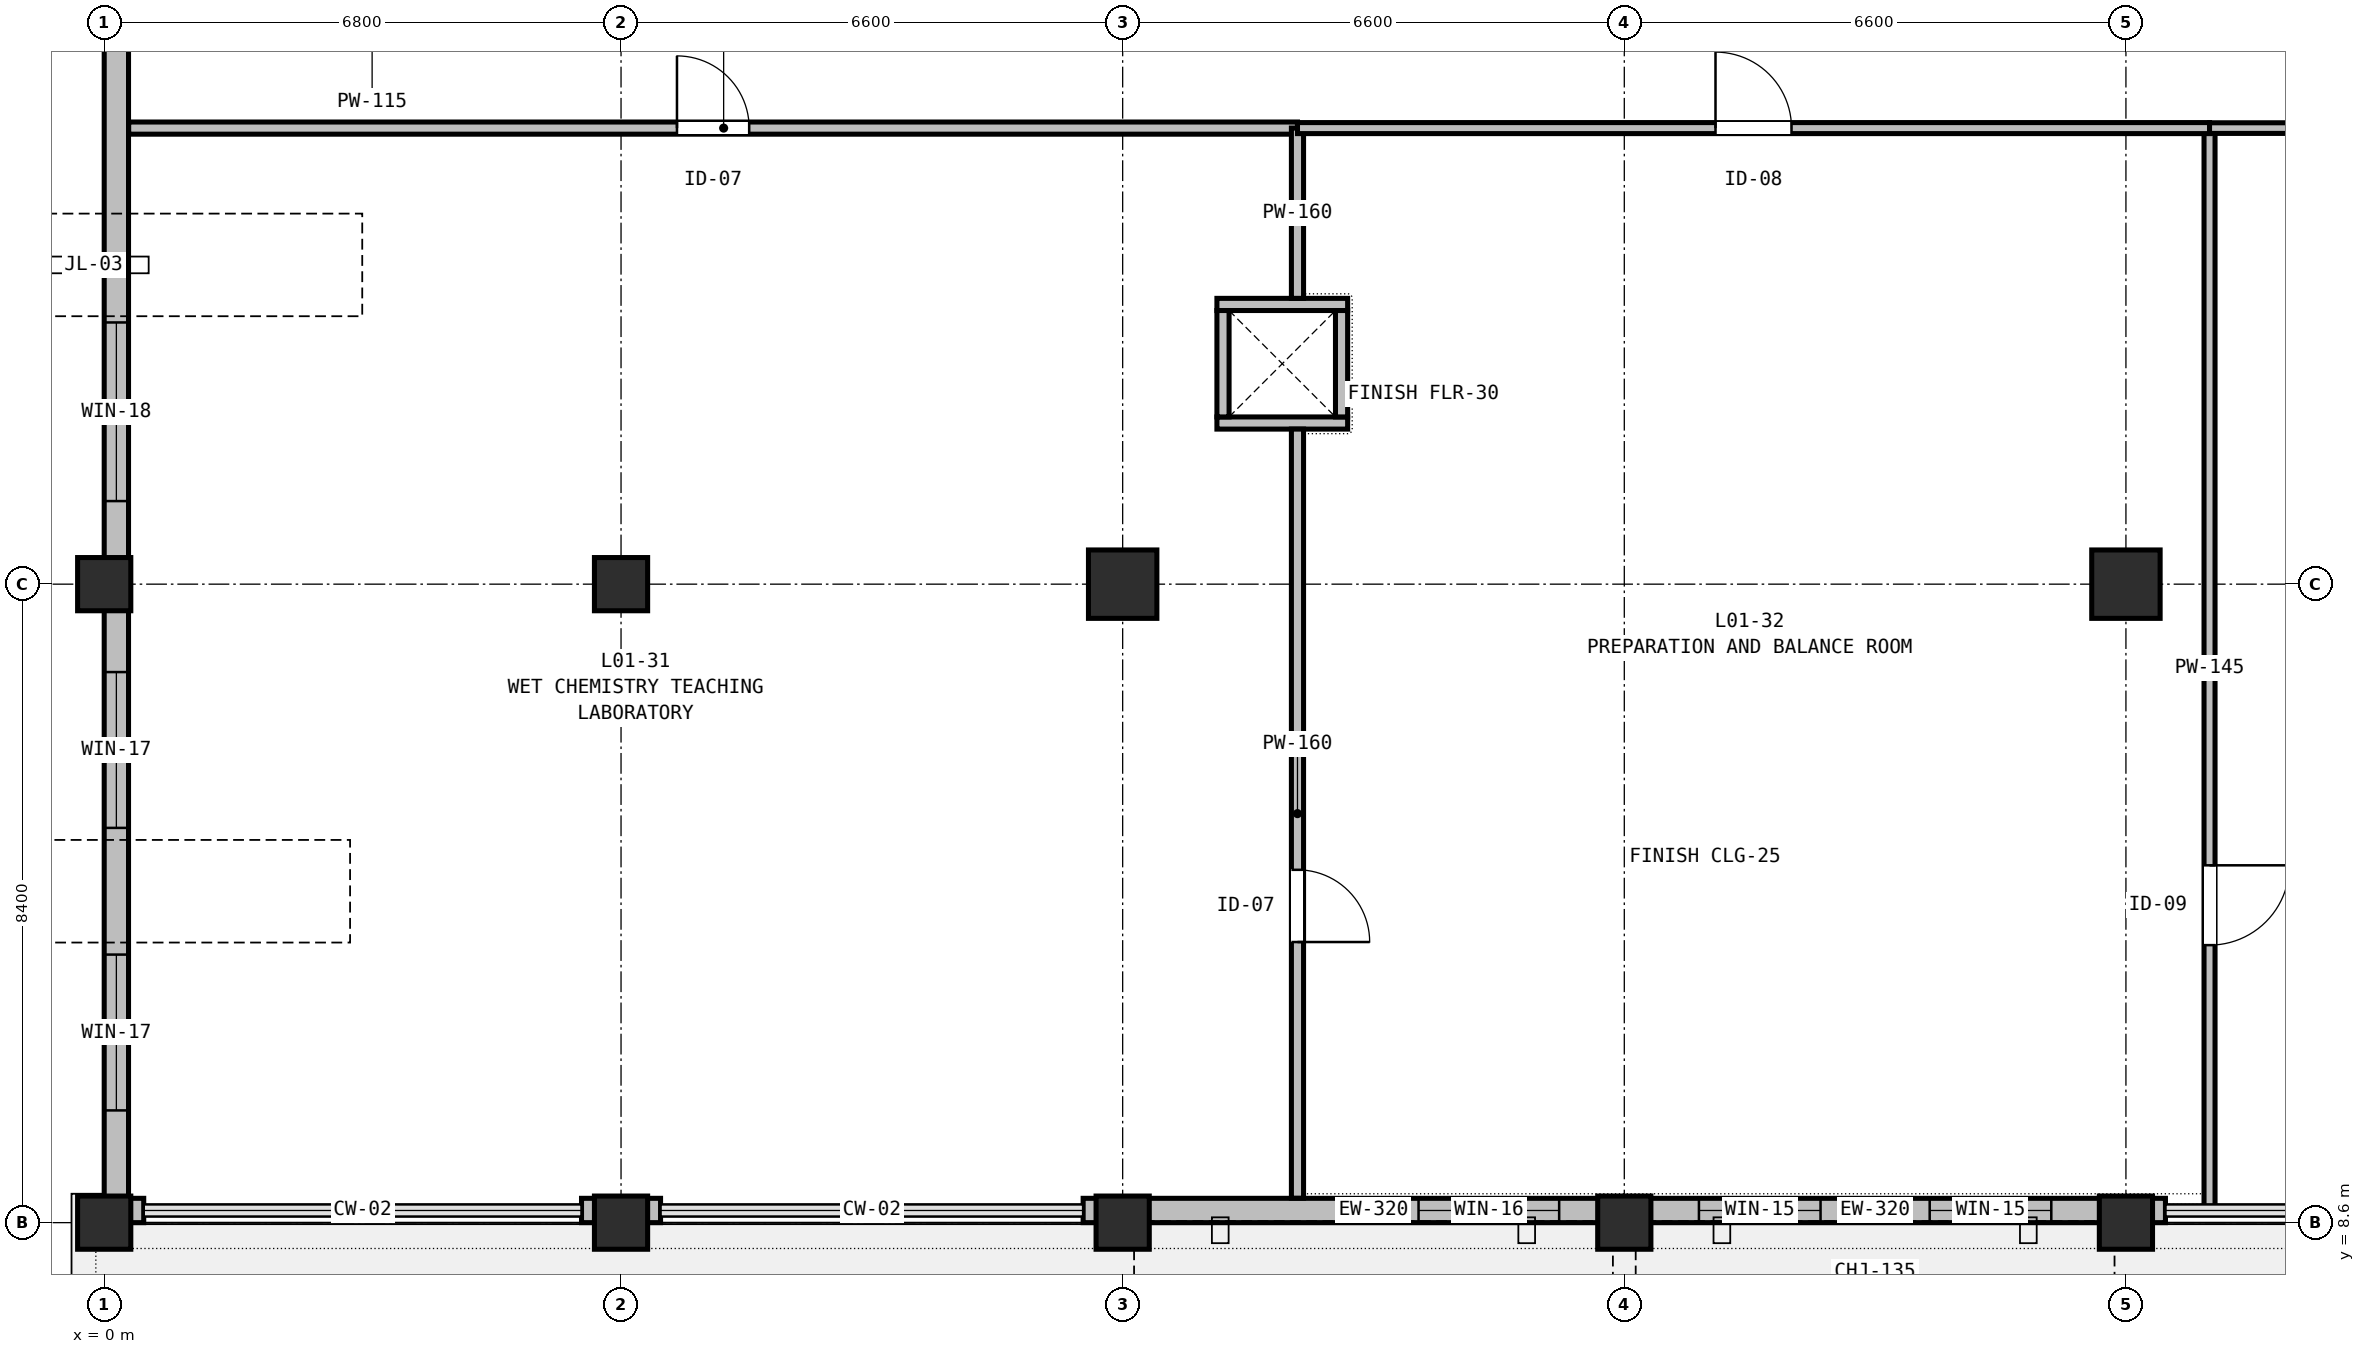
"""IFC4 building model, lengths in metres.
Left out: names, types, materials, properties, quantities, classifications, styles, units other than length and angle.
Written with IfcOpenShell. Run it as: python <this file> out.ifc"""

import sys

from ifc_helpers import new_model, si_unit, direction, frame, frame_2d, origin, origin_2d, place, context, subcontext, project, spatial, rectangle, extrude, element, fill, save


model = new_model("IFC4")
c1 = context("Model", 3, precision=1e-05, world=origin(), true_north=direction((0.0, 1.0)))
c2 = subcontext(c1, "Body", "Model", "MODEL_VIEW")
j1 = project(units=[si_unit("LENGTHUNIT", "METRE"), si_unit("PLANEANGLEUNIT", "RADIAN")], contexts=[c1])
p1 = place(None, origin())
s1 = spatial("IfcSite", under=j1, at=p1, CompositionType="ELEMENT")
p2 = place(p1, origin())
s2 = spatial("IfcBuilding", under=s1, at=p2, CompositionType="ELEMENT")
p3 = place(p2, frame((0.0, 0.0, 5.4)))
s3 = spatial("IfcBuildingStorey", under=s2, at=p3, CompositionType="ELEMENT", Elevation=5.4)
for number, where, z_axis, x_axis in (
    (1, (0.0, 8.6, 0.0), (0.0, 0.0, 1.0), (1.0, 0.0, 0.0)),
    (2, (0.0, 17.0, 0.0), (0.0, 0.0, 1.0), (1.0, 0.0, 0.0)),
):
    element("IfcColumn", number, at=place(p3, frame(where, z_axis=z_axis, x_axis=x_axis)), inside=s3, PredefinedType="COLUMN", context=c2, shape_type="SweptSolid", body=[
        extrude(rectangle(XDim=0.7, YDim=0.7, at=origin_2d()), origin(), (0.0, 0.0, 1.0), 4.74),
    ])
for number, where, z_axis, x_axis in (
    (3, (6.8, 8.6, 0.0), (0.0, 0.0, 1.0), (1.0, 0.0, 0.0)),
    (4, (6.8, 17.0, 0.0), (0.0, 0.0, 1.0), (1.0, 0.0, 0.0)),
    (5, (13.4, 8.6, 0.0), (0.0, 0.0, 1.0), (1.0, 0.0, 0.0)),
):
    element("IfcColumn", number, at=place(p3, frame(where, z_axis=z_axis, x_axis=x_axis)), inside=s3, PredefinedType="COLUMN", context=c2, shape_type="SweptSolid", body=[
        extrude(rectangle(XDim=0.7, YDim=0.7, at=origin_2d()), origin(), (0.0, 0.0, 1.0), 4.8),
    ])
p4 = place(p3, frame((13.4, 17.0, 0.0), z_axis=(0.0, 0.0, 1.0), x_axis=(1.0, 0.0, 0.0)))
e6 = element("IfcColumn", 6, at=p4, inside=s3, PredefinedType="COLUMN", context=c2, shape_type="SweptSolid", body=[
    extrude(rectangle(XDim=0.9, YDim=0.9, at=origin_2d()), origin(), (0.0, 0.0, 1.0), 4.8),
])
for number, where, z_axis, x_axis in (
    (7, (20.0, 8.6, 0.0), (0.0, 0.0, 1.0), (1.0, 0.0, 0.0)),
    (8, (26.6, 8.6, 0.0), (0.0, 0.0, 1.0), (1.0, 0.0, 0.0)),
):
    element("IfcColumn", number, at=place(p3, frame(where, z_axis=z_axis, x_axis=x_axis)), inside=s3, PredefinedType="COLUMN", context=c2, shape_type="SweptSolid", body=[
        extrude(rectangle(XDim=0.7, YDim=0.7, at=origin_2d()), origin(), (0.0, 0.0, 1.0), 4.8),
    ])
p5 = place(p3, frame((26.6, 17.0, 0.0), z_axis=(0.0, 0.0, 1.0), x_axis=(1.0, 0.0, 0.0)))
e9 = element("IfcColumn", 9, at=p5, inside=s3, PredefinedType="COLUMN", context=c2, shape_type="SweptSolid", body=[
    extrude(rectangle(XDim=0.9, YDim=0.9, at=origin_2d()), origin(), (0.0, 0.0, 1.0), 4.8),
])
p6 = place(p3, frame((27.12, 8.76, 0.0), z_axis=(0.0, 0.0, 1.0), x_axis=(-1.0, 0.0, 0.0)))
e10 = element("IfcWall", 10, at=p6, inside=s3, PredefinedType="STANDARD", context=c2, shape_type="SweptSolid", body=[
    extrude(rectangle(XDim=0.52, YDim=0.32, at=frame_2d((0.26, 0.0))), origin(), (0.0, 0.0, 1.0), 3.935),
])
p7 = place(p3, frame((26.6, 8.76, 0.0), z_axis=(0.0, 0.0, 1.0), x_axis=(-1.0, 0.0, 0.0)))
e11 = element("IfcWall", 11, at=p7, inside=s3, PredefinedType="STANDARD", context=c2, shape_type="SweptSolid", body=[
    extrude(rectangle(XDim=6.6, YDim=0.32, at=frame_2d((3.3, 0.0))), origin(), (0.0, 0.0, 1.0), 3.935),
])
p8 = place(p7, frame((0.982, 0.0, 0.9)))
e12 = element("IfcOpeningElement", 12, at=p8, cuts=e11, PredefinedType="OPENING", context=c2, shape_type="SweptSolid", body=[
    extrude(rectangle(XDim=1.6, YDim=1.6, at=frame_2d((0.8, 0.8))), frame((0.0, 0.17, 0.0), z_axis=(0.0, -1.0, 0.0), x_axis=(1.0, 0.0, 0.0)), (0.0, 0.0, 1.0), 0.34),
])
p9 = place(p7, frame((4.018, 0.0, 0.9)))
e13 = element("IfcOpeningElement", 13, at=p9, cuts=e11, PredefinedType="OPENING", context=c2, shape_type="SweptSolid", body=[
    extrude(rectangle(XDim=1.6, YDim=1.6, at=frame_2d((0.8, 0.8))), frame((0.0, 0.17, 0.0), z_axis=(0.0, -1.0, 0.0), x_axis=(1.0, 0.0, 0.0)), (0.0, 0.0, 1.0), 0.34),
])
p10 = place(p3, frame((20.0, 8.76, 0.0), z_axis=(0.0, 0.0, 1.0), x_axis=(-1.0, 0.0, 0.0)))
e14 = element("IfcWall", 14, at=p10, inside=s3, PredefinedType="STANDARD", context=c2, shape_type="SweptSolid", body=[
    extrude(rectangle(XDim=6.6, YDim=0.32, at=frame_2d((3.3, 0.0))), origin(), (0.0, 0.0, 1.0), 3.935),
])
p11 = place(p10, frame((0.857, 0.0, 0.9)))
e15 = element("IfcOpeningElement", 15, at=p11, cuts=e14, PredefinedType="OPENING", context=c2, shape_type="SweptSolid", body=[
    extrude(rectangle(XDim=1.85, YDim=1.6, at=frame_2d((0.925, 0.8))), frame((0.0, 0.17, 0.0), z_axis=(0.0, -1.0, 0.0), x_axis=(1.0, 0.0, 0.0)), (0.0, 0.0, 1.0), 0.34),
])
for number, where, z_axis, x_axis in (
    (16, (13.4, 8.76, 0.0), (0.0, 0.0, 1.0), (-1.0, 0.0, 0.0)),
    (17, (7.32, 8.76, 0.0), (0.0, 0.0, 1.0), (-1.0, 0.0, 0.0)),
    (18, (6.8, 8.76, 0.0), (0.0, 0.0, 1.0), (-1.0, 0.0, 0.0)),
    (19, (0.52, 8.76, 0.0), (0.0, 0.0, 1.0), (-1.0, 0.0, 0.0)),
):
    element("IfcWall", number, at=place(p3, frame(where, z_axis=z_axis, x_axis=x_axis)), inside=s3, PredefinedType="STANDARD", context=c2, shape_type="SweptSolid", body=[
        extrude(rectangle(XDim=0.52, YDim=0.32, at=frame_2d((0.26, 0.0))), origin(), (0.0, 0.0, 1.0), 3.935),
    ])
p12 = place(p3, frame((0.16, 8.92, 0.0), z_axis=(0.0, 0.0, 1.0), x_axis=(0.0, 1.0, 0.0)))
e20 = element("IfcWall", 20, at=p12, inside=s3, PredefinedType="STANDARD", context=c2, shape_type="SweptSolid", body=[
    extrude(rectangle(XDim=8.08, YDim=0.32, at=frame_2d((4.04, 0.0))), origin(), (0.0, 0.0, 1.0), 4.085),
])
p13 = place(p12, frame((1.156, 0.0, 0.9)))
e21 = element("IfcOpeningElement", 21, at=p13, cuts=e20, PredefinedType="OPENING", context=c2, shape_type="SweptSolid", body=[
    extrude(rectangle(XDim=2.05, YDim=1.65, at=frame_2d((1.025, 0.825))), frame((0.0, 0.17, 0.0), z_axis=(0.0, -1.0, 0.0), x_axis=(1.0, 0.0, 0.0)), (0.0, 0.0, 1.0), 0.34),
])
p14 = place(p12, frame((4.873, 0.0, 0.9)))
e22 = element("IfcOpeningElement", 22, at=p14, cuts=e20, PredefinedType="OPENING", context=c2, shape_type="SweptSolid", body=[
    extrude(rectangle(XDim=2.05, YDim=1.65, at=frame_2d((1.025, 0.825))), frame((0.0, 0.17, 0.0), z_axis=(0.0, -1.0, 0.0), x_axis=(1.0, 0.0, 0.0)), (0.0, 0.0, 1.0), 0.34),
])
p15 = place(p3, frame((0.16, 17.0, 0.0), z_axis=(0.0, 0.0, 1.0), x_axis=(0.0, 1.0, 0.0)))
e23 = element("IfcWall", 23, at=p15, inside=s3, PredefinedType="STANDARD", context=c2, shape_type="SweptSolid", body=[
    extrude(rectangle(XDim=8.4, YDim=0.32, at=frame_2d((4.2, 0.0))), origin(), (0.0, 0.0, 1.0), 4.085),
])
p16 = place(p15, frame((1.093, 0.0, 0.9)))
e24 = element("IfcOpeningElement", 24, at=p16, cuts=e23, PredefinedType="OPENING", context=c2, shape_type="SweptSolid", body=[
    extrude(rectangle(XDim=2.35, YDim=1.5, at=frame_2d((1.175, 0.75))), frame((0.0, 0.17, 0.0), z_axis=(0.0, -1.0, 0.0), x_axis=(1.0, 0.0, 0.0)), (0.0, 0.0, 1.0), 0.34),
])
p17 = place(p3, frame((-0.28, -0.28, 0.0), z_axis=(0.0, 0.0, 1.0), x_axis=(0.0, 1.0, 0.0)))
e25 = element("IfcWall", 25, at=p17, inside=s3, PredefinedType="PARAPET", context=c2, shape_type="SweptSolid", body=[
    extrude(rectangle(XDim=9.11, YDim=0.22, at=frame_2d((4.555, 0.0))), origin(), (0.0, 0.0, 1.0), 0.68),
])
for number, where, z_axis, x_axis in (
    (26, (14.64, 19.12, 0.0), (0.0, 0.0, 1.0), (1.0, 0.0, 0.0)),
    (27, (14.64, 20.68, 0.0), (0.0, 0.0, 1.0), (1.0, 0.0, 0.0)),
):
    element("IfcWall", number, at=place(p3, frame(where, z_axis=z_axis, x_axis=x_axis)), inside=s3, PredefinedType="PARTITIONING", context=c2, shape_type="SweptSolid", body=[
        extrude(rectangle(XDim=1.72, YDim=0.16, at=frame_2d((0.86, 0.0))), origin(), (0.0, 0.0, 1.0), 4.445),
    ])
for number, where, z_axis, x_axis in (
    (28, (14.72, 19.2, 0.0), (0.0, 0.0, 1.0), (0.0, 1.0, 0.0)),
    (29, (16.28, 19.2, 0.0), (0.0, 0.0, 1.0), (0.0, 1.0, 0.0)),
):
    element("IfcWall", number, at=place(p3, frame(where, z_axis=z_axis, x_axis=x_axis)), inside=s3, PredefinedType="PARTITIONING", context=c2, shape_type="SweptSolid", body=[
        extrude(rectangle(XDim=1.4, YDim=0.16, at=frame_2d((0.7, 0.0))), origin(), (0.0, 0.0, 1.0), 4.445),
    ])
p18 = place(p3, frame((15.7, 19.04, 0.0), z_axis=(0.0, 0.0, 1.0), x_axis=(0.0, -1.0, 0.0)))
e30 = element("IfcWall", 30, at=p18, inside=s3, PredefinedType="PARTITIONING", context=c2, shape_type="SweptSolid", body=[
    extrude(rectangle(XDim=10.118, YDim=0.16, at=frame_2d((5.059, 0.0))), origin(), (0.0, 0.0, 1.0), 3.385),
])
p19 = place(p18, frame((5.798, 0.0, 0.0)))
e31 = element("IfcOpeningElement", 31, at=p19, cuts=e30, PredefinedType="OPENING", context=c2, shape_type="SweptSolid", body=[
    extrude(rectangle(XDim=0.95, YDim=2.06, at=frame_2d((0.475, 1.03))), frame((0.0, 0.09, 0.0), z_axis=(0.0, -1.0, 0.0), x_axis=(1.0, 0.0, 0.0)), (0.0, 0.0, 1.0), 0.18),
])
p20 = place(p3, frame((0.322, 23.0, 0.0), z_axis=(0.0, 0.0, 1.0), x_axis=(1.0, 0.0, 0.0)))
e32 = element("IfcWall", 32, at=p20, inside=s3, PredefinedType="PARTITIONING", context=c2, shape_type="SweptSolid", body=[
    extrude(rectangle(XDim=15.378, YDim=0.16, at=frame_2d((7.689, 0.0))), origin(), (0.0, 0.0, 1.0), 3.935),
])
p21 = place(p20, frame((7.214, 0.0, 0.0)))
e33 = element("IfcOpeningElement", 33, at=p21, cuts=e32, PredefinedType="OPENING", context=c2, shape_type="SweptSolid", body=[
    extrude(rectangle(XDim=0.95, YDim=2.06, at=frame_2d((0.475, 1.03))), frame((0.0, 0.09, 0.0), z_axis=(0.0, -1.0, 0.0), x_axis=(1.0, 0.0, 0.0)), (0.0, 0.0, 1.0), 0.18),
])
p22 = place(p3, frame((15.7, 23.0, 0.0), z_axis=(0.0, 0.0, 1.0), x_axis=(0.0, -1.0, 0.0)))
e34 = element("IfcWall", 34, at=p22, inside=s3, PredefinedType="PARTITIONING", context=c2, shape_type="SweptSolid", body=[
    extrude(rectangle(XDim=2.24, YDim=0.16, at=frame_2d((1.12, 0.0))), origin(), (0.0, 0.0, 1.0), 4.445),
])
p23 = place(p3, frame((27.7, 23.0, 0.0), z_axis=(0.0, 0.0, 1.0), x_axis=(0.0, -1.0, 0.0)))
e35 = element("IfcWall", 35, at=p23, inside=s3, PredefinedType="PARTITIONING", context=c2, shape_type="SweptSolid", body=[
    extrude(rectangle(XDim=14.2, YDim=0.145, at=frame_2d((7.1, 0.0))), origin(), (0.0, 0.0, 1.0), 4.085),
])
p24 = place(p23, frame((9.699, 0.0, 0.0)))
e36 = element("IfcOpeningElement", 36, at=p24, cuts=e35, PredefinedType="OPENING", context=c2, shape_type="SweptSolid", body=[
    extrude(rectangle(XDim=1.05, YDim=2.06, at=frame_2d((0.525, 1.03))), frame((0.0, 0.083, 0.0), z_axis=(0.0, -1.0, 0.0), x_axis=(1.0, 0.0, 0.0)), (0.0, 0.0, 1.0), 0.165),
])
p25 = place(p3, frame((15.7, 23.0, 0.0), z_axis=(0.0, 0.0, 1.0), x_axis=(1.0, 0.0, 0.0)))
e37 = element("IfcWall", 37, at=p25, inside=s3, PredefinedType="PARTITIONING", context=c2, shape_type="SweptSolid", body=[
    extrude(rectangle(XDim=12.0, YDim=0.145, at=frame_2d((6.0, 0.0))), origin(), (0.0, 0.0, 1.0), 3.935),
])
p26 = place(p25, frame((5.5, 0.0, 0.0)))
e38 = element("IfcOpeningElement", 38, at=p26, cuts=e37, PredefinedType="OPENING", context=c2, shape_type="SweptSolid", body=[
    extrude(rectangle(XDim=1.0, YDim=2.06, at=frame_2d((0.5, 1.03))), frame((0.0, 0.083, 0.0), z_axis=(0.0, -1.0, 0.0), x_axis=(1.0, 0.0, 0.0)), (0.0, 0.0, 1.0), 0.165),
])
p27 = place(p3, frame((27.7, 23.0, 0.0), z_axis=(0.0, 0.0, 1.0), x_axis=(1.0, 0.0, 0.0)))
e39 = element("IfcWall", 39, at=p27, inside=s3, PredefinedType="PARTITIONING", context=c2, shape_type="SweptSolid", body=[
    extrude(rectangle(XDim=18.378, YDim=0.14, at=frame_2d((9.189, 0.0))), origin(), (0.0, 0.0, 1.0), 3.935),
])
p28 = place(p27, frame((8.664, 0.0, 0.0)))
e40 = element("IfcOpeningElement", 40, at=p28, cuts=e39, PredefinedType="OPENING", context=c2, shape_type="SweptSolid", body=[
    extrude(rectangle(XDim=1.05, YDim=2.06, at=frame_2d((0.525, 1.03))), frame((0.0, 0.08, 0.0), z_axis=(0.0, -1.0, 0.0), x_axis=(1.0, 0.0, 0.0)), (0.0, 0.0, 1.0), 0.16),
])
p29 = place(p8, origin())
e41 = element("IfcWindow", 41, at=p29, inside=s3, PartitioningType="SINGLE_PANEL", PredefinedType="WINDOW", context=c2, shape_type="SweptSolid", body=[
    extrude(rectangle(XDim=1.6, YDim=1.6, at=frame_2d((0.8, 0.8))), frame((0.0, 0.03, 0.0), z_axis=(0.0, -1.0, 0.0), x_axis=(1.0, 0.0, 0.0)), (0.0, 0.0, 1.0), 0.06),
])
fill(e12, e41)
p30 = place(p9, origin())
e42 = element("IfcWindow", 42, at=p30, inside=s3, PartitioningType="SINGLE_PANEL", PredefinedType="WINDOW", context=c2, shape_type="SweptSolid", body=[
    extrude(rectangle(XDim=1.6, YDim=1.6, at=frame_2d((0.8, 0.8))), frame((0.0, 0.03, 0.0), z_axis=(0.0, -1.0, 0.0), x_axis=(1.0, 0.0, 0.0)), (0.0, 0.0, 1.0), 0.06),
])
fill(e13, e42)
p31 = place(p11, origin())
e43 = element("IfcWindow", 43, at=p31, inside=s3, PartitioningType="SINGLE_PANEL", PredefinedType="WINDOW", context=c2, shape_type="SweptSolid", body=[
    extrude(rectangle(XDim=1.85, YDim=1.6, at=frame_2d((0.925, 0.8))), frame((0.0, 0.03, 0.0), z_axis=(0.0, -1.0, 0.0), x_axis=(1.0, 0.0, 0.0)), (0.0, 0.0, 1.0), 0.06),
])
fill(e15, e43)
p32 = place(p13, origin())
e44 = element("IfcWindow", 44, at=p32, inside=s3, PartitioningType="SINGLE_PANEL", PredefinedType="WINDOW", context=c2, shape_type="SweptSolid", body=[
    extrude(rectangle(XDim=2.05, YDim=1.65, at=frame_2d((1.025, 0.825))), frame((0.0, 0.03, 0.0), z_axis=(0.0, -1.0, 0.0), x_axis=(1.0, 0.0, 0.0)), (0.0, 0.0, 1.0), 0.06),
])
fill(e21, e44)
p33 = place(p14, origin())
e45 = element("IfcWindow", 45, at=p33, inside=s3, PartitioningType="SINGLE_PANEL", PredefinedType="WINDOW", context=c2, shape_type="SweptSolid", body=[
    extrude(rectangle(XDim=2.05, YDim=1.65, at=frame_2d((1.025, 0.825))), frame((0.0, 0.03, 0.0), z_axis=(0.0, -1.0, 0.0), x_axis=(1.0, 0.0, 0.0)), (0.0, 0.0, 1.0), 0.06),
])
fill(e22, e45)
p34 = place(p16, origin())
e46 = element("IfcWindow", 46, at=p34, inside=s3, PartitioningType="SINGLE_PANEL", PredefinedType="WINDOW", context=c2, shape_type="SweptSolid", body=[
    extrude(rectangle(XDim=2.35, YDim=1.5, at=frame_2d((1.175, 0.75))), frame((0.0, 0.03, 0.0), z_axis=(0.0, -1.0, 0.0), x_axis=(1.0, 0.0, 0.0)), (0.0, 0.0, 1.0), 0.06),
])
fill(e24, e46)
p35 = place(p21, origin())
e47 = element("IfcDoor", 47, at=p35, inside=s3, OperationType="SINGLE_SWING_LEFT", PredefinedType="DOOR", context=c2, shape_type="SweptSolid", body=[
    extrude(rectangle(XDim=0.95, YDim=2.06, at=frame_2d((0.475, 1.03))), frame((0.0, 0.025, 0.0), z_axis=(0.0, -1.0, 0.0), x_axis=(1.0, 0.0, 0.0)), (0.0, 0.0, 1.0), 0.05),
])
fill(e33, e47)
p36 = place(p19, origin())
e48 = element("IfcDoor", 48, at=p36, inside=s3, OperationType="SINGLE_SWING_RIGHT", PredefinedType="DOOR", context=c2, shape_type="SweptSolid", body=[
    extrude(rectangle(XDim=0.95, YDim=2.06, at=frame_2d((0.475, 1.03))), frame((0.0, 0.025, 0.0), z_axis=(0.0, -1.0, 0.0), x_axis=(1.0, 0.0, 0.0)), (0.0, 0.0, 1.0), 0.05),
])
fill(e31, e48)
p37 = place(p26, origin())
e49 = element("IfcDoor", 49, at=p37, inside=s3, OperationType="SINGLE_SWING_LEFT", PredefinedType="DOOR", context=c2, shape_type="SweptSolid", body=[
    extrude(rectangle(XDim=1.0, YDim=2.06, at=frame_2d((0.5, 1.03))), frame((0.0, 0.025, 0.0), z_axis=(0.0, -1.0, 0.0), x_axis=(1.0, 0.0, 0.0)), (0.0, 0.0, 1.0), 0.05),
])
fill(e38, e49)
p38 = place(p24, origin())
e50 = element("IfcDoor", 50, at=p38, inside=s3, OperationType="SINGLE_SWING_LEFT", PredefinedType="DOOR", context=c2, shape_type="SweptSolid", body=[
    extrude(rectangle(XDim=1.05, YDim=2.06, at=frame_2d((0.525, 1.03))), frame((0.0, 0.025, 0.0), z_axis=(0.0, -1.0, 0.0), x_axis=(1.0, 0.0, 0.0)), (0.0, 0.0, 1.0), 0.05),
])
fill(e36, e50)
save(model, sys.argv[1])
